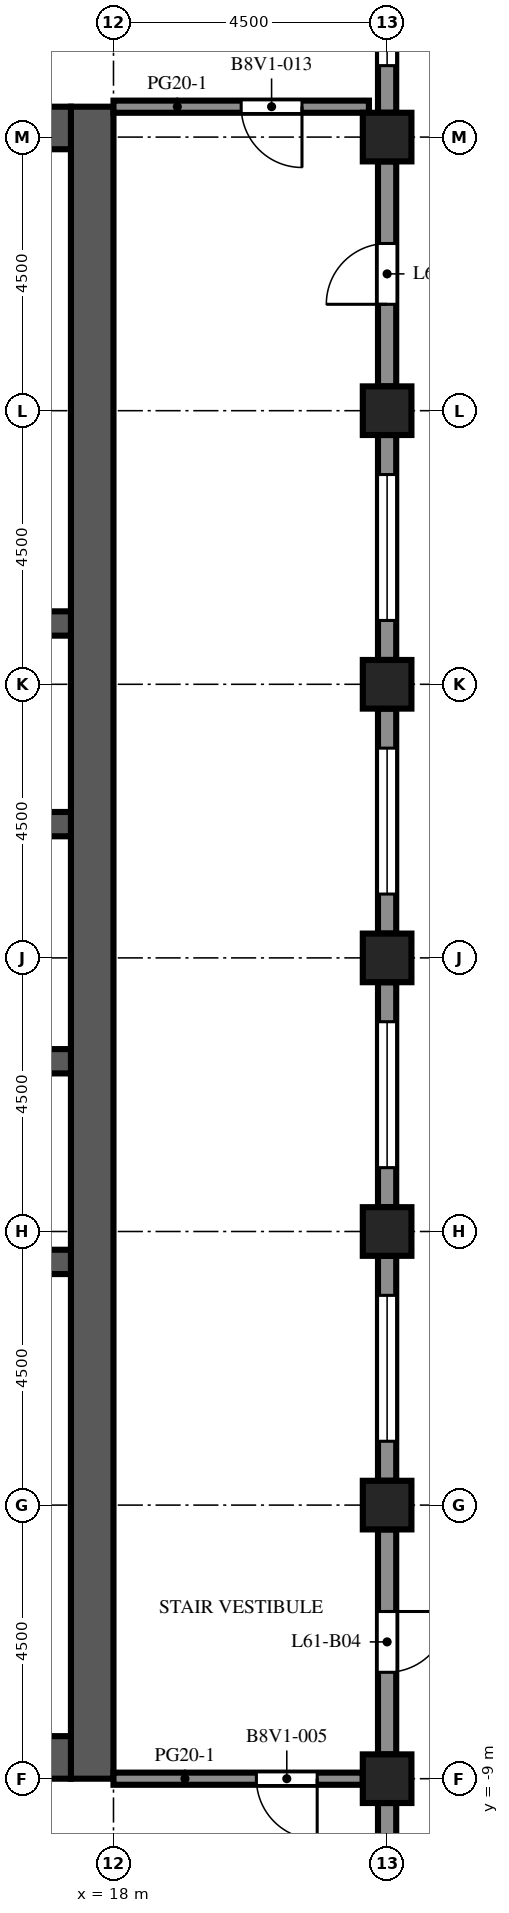
"""IFC4 building model, lengths in metres.
Left out: names, types, materials, properties, quantities, classifications, styles, units other than length and angle.
Written with IfcOpenShell. Run it as: python <this file> out.ifc"""

import sys

from ifc_helpers import new_model, si_unit, direction, frame, frame_2d, origin, origin_2d, place, context, subcontext, project, spatial, rectangle, extrude, element, fill, save


model = new_model("IFC4")
c1 = context("Model", 3, precision=1e-05, world=origin(), true_north=direction((0.0, 1.0)))
c2 = subcontext(c1, "Body", "Model", "MODEL_VIEW")
j1 = project(units=[si_unit("LENGTHUNIT", "METRE"), si_unit("PLANEANGLEUNIT", "RADIAN")], contexts=[c1])
p1 = place(None, origin())
s1 = spatial("IfcSite", under=j1, at=p1, CompositionType="ELEMENT")
p2 = place(p1, origin())
s2 = spatial("IfcBuilding", under=s1, at=p2, CompositionType="ELEMENT")
p3 = place(p2, frame((0.0, 0.0, 270.4)))
s3 = spatial("IfcBuildingStorey", under=s2, at=p3, CompositionType="ELEMENT", Elevation=270.4)
for number, where, z_axis, x_axis in (
    (1, (22.5, -9.0, 0.0), (0.0, 0.0, 1.0), (1.0, 0.0, 0.0)),
    (2, (22.5, -4.5, 0.0), (0.0, 0.0, 1.0), (1.0, 0.0, 0.0)),
    (3, (22.5, 0.0, 0.0), (0.0, 0.0, 1.0), (1.0, 0.0, 0.0)),
    (4, (22.5, 4.5, 0.0), (0.0, 0.0, 1.0), (1.0, 0.0, 0.0)),
    (5, (22.5, 9.0, 0.0), (0.0, 0.0, 1.0), (1.0, 0.0, 0.0)),
    (6, (22.5, 13.5, 0.0), (0.0, 0.0, 1.0), (1.0, 0.0, 0.0)),
    (7, (22.5, 18.0, 0.0), (0.0, 0.0, 1.0), (1.0, 0.0, 0.0)),
):
    element("IfcColumn", number, at=place(p3, frame(where, z_axis=z_axis, x_axis=x_axis)), inside=s3, PredefinedType="COLUMN", context=c2, shape_type="SweptSolid", body=[
        extrude(rectangle(XDim=0.8, YDim=0.8, at=origin_2d()), origin(), (0.0, 0.0, 1.0), 4.1),
    ])
p4 = place(p3, frame((17.65, -9.0, 0.0), z_axis=(0.0, 0.0, 1.0), x_axis=(0.0, 1.0, 0.0)))
e8 = element("IfcWall", 8, at=p4, inside=s3, PredefinedType="SHEAR", context=c2, shape_type="SweptSolid", body=[
    extrude(rectangle(XDim=27.5, YDim=0.7, at=frame_2d((13.75, 0.0))), origin(), (0.0, 0.0, 1.0), 4.1),
])
p5 = place(p4, frame((12.55, 0.0, 0.0)))
e9 = element("IfcOpeningElement", 9, at=p5, cuts=e8, PredefinedType="OPENING", context=c2, shape_type="SweptSolid", body=[
    extrude(rectangle(XDim=2.4, YDim=2.4, at=frame_2d((1.2, 1.2))), frame((0.0, 0.36, 0.0), z_axis=(0.0, -1.0, 0.0), x_axis=(1.0, 0.0, 0.0)), (0.0, 0.0, 1.0), 0.72),
])
p6 = place(p4, frame((6.825, 0.0, 0.0)))
e10 = element("IfcOpeningElement", 10, at=p6, cuts=e8, PredefinedType="OPENING", context=c2, shape_type="SweptSolid", body=[
    extrude(rectangle(XDim=1.2, YDim=2.1, at=frame_2d((0.6, 1.05))), frame((0.0, 0.36, 0.0), z_axis=(0.0, -1.0, 0.0), x_axis=(1.0, 0.0, 0.0)), (0.0, 0.0, 1.0), 0.72),
])
p7 = place(p4, frame((19.475, 0.0, 0.0)))
e11 = element("IfcOpeningElement", 11, at=p7, cuts=e8, PredefinedType="OPENING", context=c2, shape_type="SweptSolid", body=[
    extrude(rectangle(XDim=1.2, YDim=2.1, at=frame_2d((0.6, 1.05))), frame((0.0, 0.36, 0.0), z_axis=(0.0, -1.0, 0.0), x_axis=(1.0, 0.0, 0.0)), (0.0, 0.0, 1.0), 0.72),
])
for number, where, z_axis, x_axis in (
    (12, (6.7, -8.65, 0.0), (0.0, 0.0, 1.0), (1.0, 0.0, 0.0)),
    (13, (6.7, 18.15, 0.0), (0.0, 0.0, 1.0), (1.0, 0.0, 0.0)),
):
    element("IfcWall", number, at=place(p3, frame(where, z_axis=z_axis, x_axis=x_axis)), inside=s3, PredefinedType="SHEAR", context=c2, shape_type="SweptSolid", body=[
        extrude(rectangle(XDim=10.6, YDim=0.7, at=frame_2d((5.3, 0.0))), origin(), (0.0, 0.0, 1.0), 4.1),
    ])
p8 = place(p3, frame((6.7, -0.5, 0.0), z_axis=(0.0, 0.0, 1.0), x_axis=(1.0, 0.0, 0.0)))
e14 = element("IfcWall", 14, at=p8, inside=s3, PredefinedType="SHEAR", context=c2, shape_type="SweptSolid", body=[
    extrude(rectangle(XDim=10.6, YDim=0.4, at=frame_2d((5.3, 0.0))), origin(), (0.0, 0.0, 1.0), 4.1),
])
p9 = place(p3, frame((6.7, 2.8, 0.0), z_axis=(0.0, 0.0, 1.0), x_axis=(1.0, 0.0, 0.0)))
e15 = element("IfcWall", 15, at=p9, inside=s3, PredefinedType="SHEAR", context=c2, shape_type="SweptSolid", body=[
    extrude(rectangle(XDim=10.6, YDim=0.4, at=frame_2d((5.3, 0.0))), origin(), (0.0, 0.0, 1.0), 4.1),
])
p10 = place(p9, frame((0.688, 0.0, 0.0)))
e16 = element("IfcOpeningElement", 16, at=p10, cuts=e15, PredefinedType="OPENING", context=c2, shape_type="SweptSolid", body=[
    extrude(rectangle(XDim=1.1, YDim=2.1, at=frame_2d((0.55, 1.05))), frame((0.0, 0.21, 0.0), z_axis=(0.0, -1.0, 0.0), x_axis=(1.0, 0.0, 0.0)), (0.0, 0.0, 1.0), 0.42),
])
p11 = place(p9, frame((3.438, 0.0, 0.0)))
e17 = element("IfcOpeningElement", 17, at=p11, cuts=e15, PredefinedType="OPENING", context=c2, shape_type="SweptSolid", body=[
    extrude(rectangle(XDim=1.1, YDim=2.1, at=frame_2d((0.55, 1.05))), frame((0.0, 0.21, 0.0), z_axis=(0.0, -1.0, 0.0), x_axis=(1.0, 0.0, 0.0)), (0.0, 0.0, 1.0), 0.42),
])
p12 = place(p9, frame((6.113, 0.0, 0.0)))
e18 = element("IfcOpeningElement", 18, at=p12, cuts=e15, PredefinedType="OPENING", context=c2, shape_type="SweptSolid", body=[
    extrude(rectangle(XDim=1.0, YDim=2.1, at=frame_2d((0.5, 1.05))), frame((0.0, 0.21, 0.0), z_axis=(0.0, -1.0, 0.0), x_axis=(1.0, 0.0, 0.0)), (0.0, 0.0, 1.0), 0.42),
])
p13 = place(p9, frame((8.863, 0.0, 0.0)))
e19 = element("IfcOpeningElement", 19, at=p13, cuts=e15, PredefinedType="OPENING", context=c2, shape_type="SweptSolid", body=[
    extrude(rectangle(XDim=1.0, YDim=2.1, at=frame_2d((0.5, 1.05))), frame((0.0, 0.21, 0.0), z_axis=(0.0, -1.0, 0.0), x_axis=(1.0, 0.0, 0.0)), (0.0, 0.0, 1.0), 0.42),
])
p14 = place(p3, frame((6.7, 6.7, 0.0), z_axis=(0.0, 0.0, 1.0), x_axis=(1.0, 0.0, 0.0)))
e20 = element("IfcWall", 20, at=p14, inside=s3, PredefinedType="SHEAR", context=c2, shape_type="SweptSolid", body=[
    extrude(rectangle(XDim=10.6, YDim=0.4, at=frame_2d((5.3, 0.0))), origin(), (0.0, 0.0, 1.0), 4.1),
])
p15 = place(p14, frame((3.438, 0.0, 0.0)))
e21 = element("IfcOpeningElement", 21, at=p15, cuts=e20, PredefinedType="OPENING", context=c2, shape_type="SweptSolid", body=[
    extrude(rectangle(XDim=1.1, YDim=2.1, at=frame_2d((0.55, 1.05))), frame((0.0, 0.21, 0.0), z_axis=(0.0, -1.0, 0.0), x_axis=(1.0, 0.0, 0.0)), (0.0, 0.0, 1.0), 0.42),
])
p16 = place(p14, frame((6.062, 0.0, 0.0)))
e22 = element("IfcOpeningElement", 22, at=p16, cuts=e20, PredefinedType="OPENING", context=c2, shape_type="SweptSolid", body=[
    extrude(rectangle(XDim=1.1, YDim=2.1, at=frame_2d((0.55, 1.05))), frame((0.0, 0.21, 0.0), z_axis=(0.0, -1.0, 0.0), x_axis=(1.0, 0.0, 0.0)), (0.0, 0.0, 1.0), 0.42),
])
p17 = place(p14, frame((8.812, 0.0, 0.0)))
e23 = element("IfcOpeningElement", 23, at=p17, cuts=e20, PredefinedType="OPENING", context=c2, shape_type="SweptSolid", body=[
    extrude(rectangle(XDim=1.1, YDim=2.1, at=frame_2d((0.55, 1.05))), frame((0.0, 0.21, 0.0), z_axis=(0.0, -1.0, 0.0), x_axis=(1.0, 0.0, 0.0)), (0.0, 0.0, 1.0), 0.42),
])
p18 = place(p14, frame((0.738, 0.0, 0.0)))
e24 = element("IfcOpeningElement", 24, at=p18, cuts=e20, PredefinedType="OPENING", context=c2, shape_type="SweptSolid", body=[
    extrude(rectangle(XDim=1.0, YDim=2.1, at=frame_2d((0.5, 1.05))), frame((0.0, 0.21, 0.0), z_axis=(0.0, -1.0, 0.0), x_axis=(1.0, 0.0, 0.0)), (0.0, 0.0, 1.0), 0.42),
])
p19 = place(p3, frame((6.7, 10.0, 0.0), z_axis=(0.0, 0.0, 1.0), x_axis=(1.0, 0.0, 0.0)))
e25 = element("IfcWall", 25, at=p19, inside=s3, PredefinedType="SHEAR", context=c2, shape_type="SweptSolid", body=[
    extrude(rectangle(XDim=10.6, YDim=0.4, at=frame_2d((5.3, 0.0))), origin(), (0.0, 0.0, 1.0), 4.1),
])
p20 = place(p3, frame((22.5, -9.4, 0.0), z_axis=(0.0, 0.0, 1.0), x_axis=(0.0, -1.0, 0.0)))
e26 = element("IfcWall", 26, at=p20, inside=s3, PredefinedType="SOLIDWALL", context=c2, shape_type="SweptSolid", body=[
    extrude(rectangle(XDim=3.7, YDim=0.3, at=frame_2d((1.85, 0.0))), origin(), (0.0, 0.0, 1.0), 2.85),
])
p21 = place(p20, frame((0.65, 0.0, 0.8)))
e27 = element("IfcOpeningElement", 27, at=p21, cuts=e26, PredefinedType="OPENING", context=c2, shape_type="SweptSolid", body=[
    extrude(rectangle(XDim=2.4, YDim=1.7, at=frame_2d((1.2, 0.85))), frame((0.0, 0.16, 0.0), z_axis=(0.0, -1.0, 0.0), x_axis=(1.0, 0.0, 0.0)), (0.0, 0.0, 1.0), 0.32),
])
p22 = place(p3, frame((22.5, -4.9, 0.0), z_axis=(0.0, 0.0, 1.0), x_axis=(0.0, -1.0, 0.0)))
e28 = element("IfcWall", 28, at=p22, inside=s3, PredefinedType="SOLIDWALL", context=c2, shape_type="SweptSolid", body=[
    extrude(rectangle(XDim=3.7, YDim=0.3, at=frame_2d((1.85, 0.0))), origin(), (0.0, 0.0, 1.0), 2.85),
])
p23 = place(p22, frame((1.35, 0.0, 0.0)))
e29 = element("IfcOpeningElement", 29, at=p23, cuts=e28, PredefinedType="OPENING", context=c2, shape_type="SweptSolid", body=[
    extrude(rectangle(XDim=1.0, YDim=2.2, at=frame_2d((0.5, 1.1))), frame((0.0, 0.16, 0.0), z_axis=(0.0, -1.0, 0.0), x_axis=(1.0, 0.0, 0.0)), (0.0, 0.0, 1.0), 0.32),
])
p24 = place(p3, frame((22.5, -0.4, 0.0), z_axis=(0.0, 0.0, 1.0), x_axis=(0.0, -1.0, 0.0)))
e30 = element("IfcWall", 30, at=p24, inside=s3, PredefinedType="SOLIDWALL", context=c2, shape_type="SweptSolid", body=[
    extrude(rectangle(XDim=3.7, YDim=0.3, at=frame_2d((1.85, 0.0))), origin(), (0.0, 0.0, 1.0), 2.85),
])
p25 = place(p24, frame((0.65, 0.0, 0.8)))
e31 = element("IfcOpeningElement", 31, at=p25, cuts=e30, PredefinedType="OPENING", context=c2, shape_type="SweptSolid", body=[
    extrude(rectangle(XDim=2.4, YDim=1.7, at=frame_2d((1.2, 0.85))), frame((0.0, 0.16, 0.0), z_axis=(0.0, -1.0, 0.0), x_axis=(1.0, 0.0, 0.0)), (0.0, 0.0, 1.0), 0.32),
])
p26 = place(p3, frame((22.5, 4.1, 0.0), z_axis=(0.0, 0.0, 1.0), x_axis=(0.0, -1.0, 0.0)))
e32 = element("IfcWall", 32, at=p26, inside=s3, PredefinedType="SOLIDWALL", context=c2, shape_type="SweptSolid", body=[
    extrude(rectangle(XDim=3.7, YDim=0.3, at=frame_2d((1.85, 0.0))), origin(), (0.0, 0.0, 1.0), 2.85),
])
p27 = place(p26, frame((0.65, 0.0, 0.8)))
e33 = element("IfcOpeningElement", 33, at=p27, cuts=e32, PredefinedType="OPENING", context=c2, shape_type="SweptSolid", body=[
    extrude(rectangle(XDim=2.4, YDim=1.7, at=frame_2d((1.2, 0.85))), frame((0.0, 0.16, 0.0), z_axis=(0.0, -1.0, 0.0), x_axis=(1.0, 0.0, 0.0)), (0.0, 0.0, 1.0), 0.32),
])
p28 = place(p3, frame((22.5, 8.6, 0.0), z_axis=(0.0, 0.0, 1.0), x_axis=(0.0, -1.0, 0.0)))
e34 = element("IfcWall", 34, at=p28, inside=s3, PredefinedType="SOLIDWALL", context=c2, shape_type="SweptSolid", body=[
    extrude(rectangle(XDim=3.7, YDim=0.3, at=frame_2d((1.85, 0.0))), origin(), (0.0, 0.0, 1.0), 2.85),
])
p29 = place(p28, frame((0.65, 0.0, 0.8)))
e35 = element("IfcOpeningElement", 35, at=p29, cuts=e34, PredefinedType="OPENING", context=c2, shape_type="SweptSolid", body=[
    extrude(rectangle(XDim=2.4, YDim=1.7, at=frame_2d((1.2, 0.85))), frame((0.0, 0.16, 0.0), z_axis=(0.0, -1.0, 0.0), x_axis=(1.0, 0.0, 0.0)), (0.0, 0.0, 1.0), 0.32),
])
p30 = place(p3, frame((22.5, 13.1, 0.0), z_axis=(0.0, 0.0, 1.0), x_axis=(0.0, -1.0, 0.0)))
e36 = element("IfcWall", 36, at=p30, inside=s3, PredefinedType="SOLIDWALL", context=c2, shape_type="SweptSolid", body=[
    extrude(rectangle(XDim=3.7, YDim=0.3, at=frame_2d((1.85, 0.0))), origin(), (0.0, 0.0, 1.0), 2.85),
])
p31 = place(p30, frame((0.65, 0.0, 0.8)))
e37 = element("IfcOpeningElement", 37, at=p31, cuts=e36, PredefinedType="OPENING", context=c2, shape_type="SweptSolid", body=[
    extrude(rectangle(XDim=2.4, YDim=1.7, at=frame_2d((1.2, 0.85))), frame((0.0, 0.16, 0.0), z_axis=(0.0, -1.0, 0.0), x_axis=(1.0, 0.0, 0.0)), (0.0, 0.0, 1.0), 0.32),
])
p32 = place(p3, frame((22.5, 17.6, 0.0), z_axis=(0.0, 0.0, 1.0), x_axis=(0.0, -1.0, 0.0)))
e38 = element("IfcWall", 38, at=p32, inside=s3, PredefinedType="SOLIDWALL", context=c2, shape_type="SweptSolid", body=[
    extrude(rectangle(XDim=3.7, YDim=0.3, at=frame_2d((1.85, 0.0))), origin(), (0.0, 0.0, 1.0), 2.85),
])
p33 = place(p32, frame((1.35, 0.0, 0.0)))
e39 = element("IfcOpeningElement", 39, at=p33, cuts=e38, PredefinedType="OPENING", context=c2, shape_type="SweptSolid", body=[
    extrude(rectangle(XDim=1.0, YDim=2.2, at=frame_2d((0.5, 1.1))), frame((0.0, 0.16, 0.0), z_axis=(0.0, -1.0, 0.0), x_axis=(1.0, 0.0, 0.0)), (0.0, 0.0, 1.0), 0.32),
])
p34 = place(p3, frame((22.5, 22.1, 0.0), z_axis=(0.0, 0.0, 1.0), x_axis=(0.0, -1.0, 0.0)))
e40 = element("IfcWall", 40, at=p34, inside=s3, PredefinedType="SOLIDWALL", context=c2, shape_type="SweptSolid", body=[
    extrude(rectangle(XDim=3.7, YDim=0.3, at=frame_2d((1.85, 0.0))), origin(), (0.0, 0.0, 1.0), 2.85),
])
p35 = place(p34, frame((0.525, 0.0, 0.8)))
e41 = element("IfcOpeningElement", 41, at=p35, cuts=e40, PredefinedType="OPENING", context=c2, shape_type="SweptSolid", body=[
    extrude(rectangle(XDim=2.4, YDim=1.7, at=frame_2d((1.2, 0.85))), frame((0.0, 0.16, 0.0), z_axis=(0.0, -1.0, 0.0), x_axis=(1.0, 0.0, 0.0)), (0.0, 0.0, 1.0), 0.32),
])
p36 = place(p3, frame((22.1, -9.0, 0.0), z_axis=(0.0, 0.0, 1.0), x_axis=(-1.0, 0.0, 0.0)))
e42 = element("IfcWall", 42, at=p36, inside=s3, PredefinedType="PARTITIONING", context=c2, shape_type="SweptSolid", body=[
    extrude(rectangle(XDim=4.1, YDim=0.2, at=frame_2d((2.05, 0.0))), origin(), (0.0, 0.0, 1.0), 3.65),
])
p37 = place(p36, frame((0.75, 0.0, 0.0)))
e43 = element("IfcOpeningElement", 43, at=p37, cuts=e42, PredefinedType="OPENING", context=c2, shape_type="SweptSolid", body=[
    extrude(rectangle(XDim=1.0, YDim=2.1, at=frame_2d((0.5, 1.05))), frame((0.0, 0.11, 0.0), z_axis=(0.0, -1.0, 0.0), x_axis=(1.0, 0.0, 0.0)), (0.0, 0.0, 1.0), 0.22),
])
p38 = place(p3, frame((18.0, 18.5, 0.0), z_axis=(0.0, 0.0, 1.0), x_axis=(1.0, 0.0, 0.0)))
e44 = element("IfcWall", 44, at=p38, inside=s3, PredefinedType="PARTITIONING", context=c2, shape_type="SweptSolid", body=[
    extrude(rectangle(XDim=4.201, YDim=0.2, at=frame_2d((2.101, 0.0))), origin(), (0.0, 0.0, 1.0), 3.65),
])
p39 = place(p38, frame((2.1, 0.0, 0.0)))
e45 = element("IfcOpeningElement", 45, at=p39, cuts=e44, PredefinedType="OPENING", context=c2, shape_type="SweptSolid", body=[
    extrude(rectangle(XDim=1.0, YDim=2.1, at=frame_2d((0.5, 1.05))), frame((0.0, 0.11, 0.0), z_axis=(0.0, -1.0, 0.0), x_axis=(1.0, 0.0, 0.0)), (0.0, 0.0, 1.0), 0.22),
])
p40 = place(p23, origin())
e46 = element("IfcDoor", 46, at=p40, inside=s3, OperationType="SINGLE_SWING_LEFT", PredefinedType="DOOR", context=c2, shape_type="SweptSolid", body=[
    extrude(rectangle(XDim=1.0, YDim=2.2, at=frame_2d((0.5, 1.1))), frame((0.0, 0.025, 0.0), z_axis=(0.0, -1.0, 0.0), x_axis=(1.0, 0.0, 0.0)), (0.0, 0.0, 1.0), 0.05),
])
fill(e29, e46)
p41 = place(p25, origin())
e47 = element("IfcWindow", 47, at=p41, inside=s3, PartitioningType="SINGLE_PANEL", PredefinedType="WINDOW", context=c2, shape_type="SweptSolid", body=[
    extrude(rectangle(XDim=2.4, YDim=1.7, at=frame_2d((1.2, 0.85))), frame((0.0, 0.03, 0.0), z_axis=(0.0, -1.0, 0.0), x_axis=(1.0, 0.0, 0.0)), (0.0, 0.0, 1.0), 0.06),
])
fill(e31, e47)
p42 = place(p27, origin())
e48 = element("IfcWindow", 48, at=p42, inside=s3, PartitioningType="SINGLE_PANEL", PredefinedType="WINDOW", context=c2, shape_type="SweptSolid", body=[
    extrude(rectangle(XDim=2.4, YDim=1.7, at=frame_2d((1.2, 0.85))), frame((0.0, 0.03, 0.0), z_axis=(0.0, -1.0, 0.0), x_axis=(1.0, 0.0, 0.0)), (0.0, 0.0, 1.0), 0.06),
])
fill(e33, e48)
p43 = place(p29, origin())
e49 = element("IfcWindow", 49, at=p43, inside=s3, PartitioningType="SINGLE_PANEL", PredefinedType="WINDOW", context=c2, shape_type="SweptSolid", body=[
    extrude(rectangle(XDim=2.4, YDim=1.7, at=frame_2d((1.2, 0.85))), frame((0.0, 0.03, 0.0), z_axis=(0.0, -1.0, 0.0), x_axis=(1.0, 0.0, 0.0)), (0.0, 0.0, 1.0), 0.06),
])
fill(e35, e49)
p44 = place(p31, origin())
e50 = element("IfcWindow", 50, at=p44, inside=s3, PartitioningType="SINGLE_PANEL", PredefinedType="WINDOW", context=c2, shape_type="SweptSolid", body=[
    extrude(rectangle(XDim=2.4, YDim=1.7, at=frame_2d((1.2, 0.85))), frame((0.0, 0.03, 0.0), z_axis=(0.0, -1.0, 0.0), x_axis=(1.0, 0.0, 0.0)), (0.0, 0.0, 1.0), 0.06),
])
fill(e37, e50)
p45 = place(p33, origin())
e51 = element("IfcDoor", 51, at=p45, inside=s3, OperationType="SINGLE_SWING_RIGHT", PredefinedType="DOOR", context=c2, shape_type="SweptSolid", body=[
    extrude(rectangle(XDim=1.0, YDim=2.2, at=frame_2d((0.5, 1.1))), frame((0.0, 0.025, 0.0), z_axis=(0.0, -1.0, 0.0), x_axis=(1.0, 0.0, 0.0)), (0.0, 0.0, 1.0), 0.05),
])
fill(e39, e51)
p46 = place(p35, origin())
e52 = element("IfcWindow", 52, at=p46, inside=s3, PartitioningType="SINGLE_PANEL", PredefinedType="WINDOW", context=c2, shape_type="SweptSolid", body=[
    extrude(rectangle(XDim=2.4, YDim=1.7, at=frame_2d((1.2, 0.85))), frame((0.0, 0.03, 0.0), z_axis=(0.0, -1.0, 0.0), x_axis=(1.0, 0.0, 0.0)), (0.0, 0.0, 1.0), 0.06),
])
fill(e41, e52)
p47 = place(p5, origin())
e53 = element("IfcDoor", 53, at=p47, inside=s3, OperationType="DOUBLE_DOOR_DOUBLE_SWING", PredefinedType="DOOR", context=c2, shape_type="SweptSolid", body=[
    extrude(rectangle(XDim=2.4, YDim=2.4, at=frame_2d((1.2, 1.2))), frame((0.0, 0.025, 0.0), z_axis=(0.0, -1.0, 0.0), x_axis=(1.0, 0.0, 0.0)), (0.0, 0.0, 1.0), 0.05),
])
fill(e9, e53)
p48 = place(p6, frame((1.2, 0.0, 0.0), z_axis=(0.0, 0.0, 1.0), x_axis=(-1.0, 0.0, 0.0)))
e54 = element("IfcDoor", 54, at=p48, inside=s3, OperationType="SINGLE_SWING_LEFT", PredefinedType="DOOR", context=c2, shape_type="SweptSolid", body=[
    extrude(rectangle(XDim=1.2, YDim=2.1, at=frame_2d((0.6, 1.05))), frame((0.0, 0.025, 0.0), z_axis=(0.0, -1.0, 0.0), x_axis=(1.0, 0.0, 0.0)), (0.0, 0.0, 1.0), 0.05),
])
fill(e10, e54)
p49 = place(p7, frame((1.2, 0.0, 0.0), z_axis=(0.0, 0.0, 1.0), x_axis=(-1.0, 0.0, 0.0)))
e55 = element("IfcDoor", 55, at=p49, inside=s3, OperationType="SINGLE_SWING_LEFT", PredefinedType="DOOR", context=c2, shape_type="SweptSolid", body=[
    extrude(rectangle(XDim=1.2, YDim=2.1, at=frame_2d((0.6, 1.05))), frame((0.0, 0.025, 0.0), z_axis=(0.0, -1.0, 0.0), x_axis=(1.0, 0.0, 0.0)), (0.0, 0.0, 1.0), 0.05),
])
fill(e11, e55)
p50 = place(p37, origin())
e56 = element("IfcDoor", 56, at=p50, inside=s3, OperationType="SINGLE_SWING_LEFT", PredefinedType="DOOR", context=c2, shape_type="SweptSolid", body=[
    extrude(rectangle(XDim=1.0, YDim=2.1, at=frame_2d((0.5, 1.05))), frame((0.0, 0.025, 0.0), z_axis=(0.0, -1.0, 0.0), x_axis=(1.0, 0.0, 0.0)), (0.0, 0.0, 1.0), 0.05),
])
fill(e43, e56)
p51 = place(p39, origin())
e57 = element("IfcDoor", 57, at=p51, inside=s3, OperationType="SINGLE_SWING_RIGHT", PredefinedType="DOOR", context=c2, shape_type="SweptSolid", body=[
    extrude(rectangle(XDim=1.0, YDim=2.1, at=frame_2d((0.5, 1.05))), frame((0.0, 0.025, 0.0), z_axis=(0.0, -1.0, 0.0), x_axis=(1.0, 0.0, 0.0)), (0.0, 0.0, 1.0), 0.05),
])
fill(e45, e57)
save(model, sys.argv[1])
